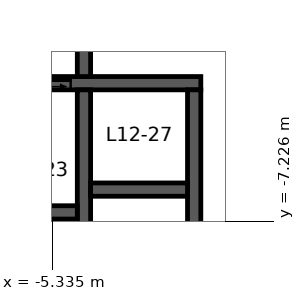
"""IFC4 building model, lengths in metres.
Left out: names, types, materials, properties, quantities, classifications, styles, units other than length and angle.
Written with IfcOpenShell. Run it as: python <this file> out.ifc"""

import sys

from ifc_helpers import new_model, si_unit, direction, frame, frame_2d, origin, place, context, subcontext, project, spatial, polyline, rectangle, outline, extrude, element, fill, save


model = new_model("IFC4")
c1 = context("Model", 3, precision=1e-05, world=origin(), true_north=direction((0.0, 1.0)))
c2 = subcontext(c1, "Body", "Model", "MODEL_VIEW")
j1 = project(units=[si_unit("LENGTHUNIT", "METRE"), si_unit("PLANEANGLEUNIT", "RADIAN")], contexts=[c1])
p1 = place(None, origin())
s1 = spatial("IfcSite", under=j1, at=p1, CompositionType="ELEMENT")
p2 = place(p1, origin())
s2 = spatial("IfcBuilding", under=s1, at=p2, CompositionType="ELEMENT")
p3 = place(p2, frame((0.0, 0.0, 47.8)))
s3 = spatial("IfcBuildingStorey", under=s2, at=p3, CompositionType="ELEMENT", Elevation=47.8)
p4 = place(p3, frame((-9.151, -3.6, 0.0), z_axis=(0.0, 0.0, 1.0), x_axis=(1.0, 0.0, 0.0)))
e1 = element("IfcWall", 1, at=p4, inside=s3, PredefinedType="SHEAR", context=c2, shape_type="SweptSolid", body=[
    extrude(outline(polyline([(0.101, -0.175), (3.001, -0.175), (4.301, -0.175), (7.726, -0.175), (7.726, 0.175), (4.301, 0.175), (3.001, 0.175), (-0.101, 0.175), (0.101, -0.175)])), origin(), (0.0, 0.0, 1.0), 4.2),
])
p5 = place(p4, frame((3.001, 0.0, 0.0)))
e2 = element("IfcOpeningElement", 2, at=p5, cuts=e1, PredefinedType="OPENING", context=c2, shape_type="SweptSolid", body=[
    extrude(rectangle(XDim=1.3, YDim=2.1, at=frame_2d((0.65, 1.05))), frame((0.0, 0.185, 0.0), z_axis=(0.0, -1.0, 0.0), x_axis=(1.0, 0.0, 0.0)), (0.0, 0.0, 1.0), 0.37),
])
p6 = place(p3, frame((-1.6, -3.775, 0.0), z_axis=(0.0, 0.0, 1.0), x_axis=(0.0, -1.0, 0.0)))
e3 = element("IfcWall", 3, at=p6, inside=s3, PredefinedType="SHEAR", context=c2, shape_type="SweptSolid", body=[
    extrude(rectangle(XDim=5.95, YDim=0.35, at=frame_2d((2.975, 0.0))), origin(), (0.0, 0.0, 1.0), 4.2),
])
p7 = place(p6, frame((3.775, 0.0, 0.0)))
e4 = element("IfcOpeningElement", 4, at=p7, cuts=e3, PredefinedType="OPENING", context=c2, shape_type="SweptSolid", body=[
    extrude(rectangle(XDim=0.9, YDim=2.1, at=frame_2d((0.45, 1.05))), frame((0.0, 0.185, 0.0), z_axis=(0.0, -1.0, 0.0), x_axis=(1.0, 0.0, 0.0)), (0.0, 0.0, 1.0), 0.37),
])
p8 = place(p3, frame((-4.5, -3.425, 0.0), z_axis=(0.0, 0.0, 1.0), x_axis=(0.0, 1.0, 0.0)))
e5 = element("IfcWall", 5, at=p8, inside=s3, PredefinedType="SHEAR", context=c2, shape_type="SweptSolid", body=[
    extrude(rectangle(XDim=6.85, YDim=0.35, at=frame_2d((3.425, 0.0))), origin(), (0.0, 0.0, 1.0), 4.2),
])
p9 = place(p8, frame((2.925, 0.0, 0.0)))
e6 = element("IfcOpeningElement", 6, at=p9, cuts=e5, PredefinedType="OPENING", context=c2, shape_type="SweptSolid", body=[
    extrude(rectangle(XDim=1.0, YDim=2.1, at=frame_2d((0.5, 1.05))), frame((0.0, 0.185, 0.0), z_axis=(0.0, -1.0, 0.0), x_axis=(1.0, 0.0, 0.0)), (0.0, 0.0, 1.0), 0.37),
])
p10 = place(p3, frame((-4.5, -3.775, 0.0), z_axis=(0.0, 0.0, 1.0), x_axis=(0.0, -1.0, 0.0)))
e7 = element("IfcWall", 7, at=p10, inside=s3, PredefinedType="SHEAR", context=c2, shape_type="SweptSolid", body=[
    extrude(rectangle(XDim=5.95, YDim=0.35, at=frame_2d((2.975, 0.0))), origin(), (0.0, 0.0, 1.0), 4.2),
])
p11 = place(p3, frame((-4.325, -6.4, 0.0), z_axis=(0.0, 0.0, 1.0), x_axis=(1.0, 0.0, 0.0)))
e8 = element("IfcWall", 8, at=p11, inside=s3, PredefinedType="SHEAR", context=c2, shape_type="SweptSolid", body=[
    extrude(rectangle(XDim=2.55, YDim=0.35, at=frame_2d((1.275, 0.0))), origin(), (0.0, 0.0, 1.0), 4.2),
])
p12 = place(p3, frame((-6.925, -7.0, 0.0), z_axis=(0.0, 0.0, 1.0), x_axis=(1.0, 0.0, 0.0)))
e9 = element("IfcWall", 9, at=p12, inside=s3, PredefinedType="SHEAR", context=c2, shape_type="SweptSolid", body=[
    extrude(rectangle(XDim=2.25, YDim=0.35, at=frame_2d((1.125, 0.0))), origin(), (0.0, 0.0, 1.0), 4.2),
])
p13 = place(p5, origin())
e10 = element("IfcDoor", 10, at=p13, inside=s3, OperationType="DOUBLE_DOOR_SLIDING", PredefinedType="DOOR", context=c2, shape_type="SweptSolid", body=[
    extrude(rectangle(XDim=1.3, YDim=2.1, at=frame_2d((0.65, 1.05))), frame((0.0, 0.025, 0.0), z_axis=(0.0, -1.0, 0.0), x_axis=(1.0, 0.0, 0.0)), (0.0, 0.0, 1.0), 0.05),
])
fill(e2, e10)
save(model, sys.argv[1])
